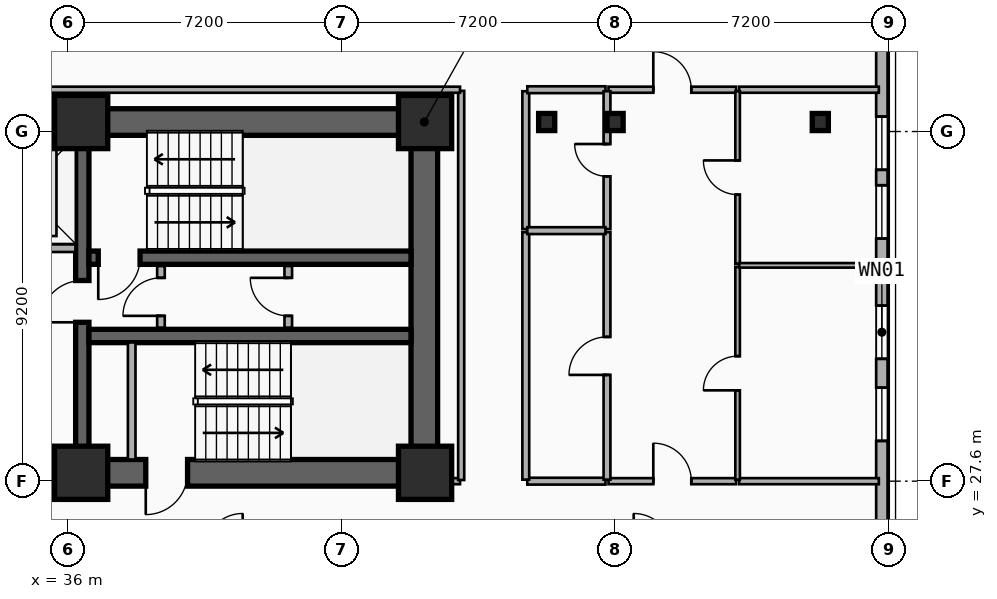
"""IFC4 building model, lengths in metres.
Left out: names, types, materials, properties, quantities, classifications, styles, units other than length and angle.
Written with IfcOpenShell. Run it as: python <this file> out.ifc"""

import sys

from ifc_helpers import new_model, si_unit, direction, frame, frame_2d, origin, origin_2d, place, context, subcontext, project, spatial, rectangle, i_section, extrude, element, fill, save


model = new_model("IFC4")
c1 = context("Model", 3, precision=1e-05, world=origin(), true_north=direction((0.0, 1.0)))
c2 = subcontext(c1, "Body", "Model", "MODEL_VIEW")
j1 = project(units=[si_unit("LENGTHUNIT", "METRE"), si_unit("PLANEANGLEUNIT", "RADIAN")], contexts=[c1])
p1 = place(None, origin())
s1 = spatial("IfcSite", under=j1, at=p1, CompositionType="ELEMENT")
p2 = place(p1, origin())
s2 = spatial("IfcBuilding", under=s1, at=p2, CompositionType="ELEMENT")
p3 = place(p2, frame((0.0, 0.0, 64.0)))
s3 = spatial("IfcBuildingStorey", under=s2, at=p3, CompositionType="ELEMENT", Elevation=64.0)
p4 = place(p3, frame((12.15, 37.05, 0.0), z_axis=(0.0, 0.0, 1.0), x_axis=(1.0, 0.0, 0.0)))
e1 = element("IfcWall", 1, at=p4, inside=s3, PredefinedType="SHEAR", context=c2, shape_type="SweptSolid", body=[
    extrude(rectangle(XDim=33.23, YDim=0.7, at=frame_2d((16.615, 0.0))), origin(), (0.0, 0.0, 1.0), 3.5),
])
p5 = place(p3, frame((45.38, 27.82, 0.0), z_axis=(0.0, 0.0, 1.0), x_axis=(-1.0, 0.0, 0.0)))
e2 = element("IfcWall", 2, at=p5, inside=s3, PredefinedType="SHEAR", context=c2, shape_type="SweptSolid", body=[
    extrude(rectangle(XDim=12.23, YDim=0.7, at=frame_2d((6.115, 0.0))), origin(), (0.0, 0.0, 1.0), 3.5),
])
p6 = place(p5, frame((9.93, 0.0, 0.0)))
e3 = element("IfcOpeningElement", 3, at=p6, cuts=e2, PredefinedType="OPENING", context=c2, shape_type="SweptSolid", body=[
    extrude(rectangle(XDim=1.1, YDim=2.15, at=frame_2d((0.55, 1.075))), frame((0.0, 0.36, 0.0), z_axis=(0.0, -1.0, 0.0), x_axis=(1.0, 0.0, 0.0)), (0.0, 0.0, 1.0), 0.72),
])
p7 = place(p5, frame((6.23, 0.0, 0.0)))
e4 = element("IfcOpeningElement", 4, at=p7, cuts=e2, PredefinedType="OPENING", context=c2, shape_type="SweptSolid", body=[
    extrude(rectangle(XDim=1.1, YDim=2.15, at=frame_2d((0.55, 1.075))), frame((0.0, 0.36, 0.0), z_axis=(0.0, -1.0, 0.0), x_axis=(1.0, 0.0, 0.0)), (0.0, 0.0, 1.0), 0.72),
])
p8 = place(p3, frame((45.38, 28.17, 0.0), z_axis=(0.0, 0.0, 1.0), x_axis=(0.0, 1.0, 0.0)))
e5 = element("IfcWall", 5, at=p8, inside=s3, PredefinedType="SHEAR", context=c2, shape_type="SweptSolid", body=[
    extrude(rectangle(XDim=8.53, YDim=0.7, at=frame_2d((4.265, 0.0))), origin(), (0.0, 0.0, 1.0), 3.5),
])
p9 = place(p3, frame((36.38, 28.17, 0.0), z_axis=(0.0, 0.0, 1.0), x_axis=(0.0, 1.0, 0.0)))
e6 = element("IfcWall", 6, at=p9, inside=s3, PredefinedType="SHEAR", context=c2, shape_type="SweptSolid", body=[
    extrude(rectangle(XDim=8.53, YDim=0.35, at=frame_2d((4.265, 0.0))), origin(), (0.0, 0.0, 1.0), 3.5),
])
p10 = place(p9, frame((3.61, 0.0, 0.0)))
e7 = element("IfcOpeningElement", 7, at=p10, cuts=e6, PredefinedType="OPENING", context=c2, shape_type="SweptSolid", body=[
    extrude(rectangle(XDim=1.1, YDim=2.15, at=frame_2d((0.55, 1.075))), frame((0.0, 0.185, 0.0), z_axis=(0.0, -1.0, 0.0), x_axis=(1.0, 0.0, 0.0)), (0.0, 0.0, 1.0), 0.37),
])
p11 = place(p3, frame((45.03, 33.48, 0.0), z_axis=(0.0, 0.0, 1.0), x_axis=(-1.0, 0.0, 0.0)))
e8 = element("IfcWall", 8, at=p11, inside=s3, PredefinedType="SHEAR", context=c2, shape_type="SweptSolid", body=[
    extrude(rectangle(XDim=8.475, YDim=0.35, at=frame_2d((4.238, 0.0))), origin(), (0.0, 0.0, 1.0), 3.5),
])
p12 = place(p11, frame((7.13, 0.0, 0.0)))
e9 = element("IfcOpeningElement", 9, at=p12, cuts=e8, PredefinedType="OPENING", context=c2, shape_type="SweptSolid", body=[
    extrude(rectangle(XDim=1.1, YDim=2.15, at=frame_2d((0.55, 1.075))), frame((0.0, 0.185, 0.0), z_axis=(0.0, -1.0, 0.0), x_axis=(1.0, 0.0, 0.0)), (0.0, 0.0, 1.0), 0.37),
])
p13 = place(p3, frame((36.555, 31.42, 0.0), z_axis=(0.0, 0.0, 1.0), x_axis=(1.0, 0.0, 0.0)))
e10 = element("IfcWall", 10, at=p13, inside=s3, PredefinedType="SHEAR", context=c2, shape_type="SweptSolid", body=[
    extrude(rectangle(XDim=8.475, YDim=0.35, at=frame_2d((4.238, 0.0))), origin(), (0.0, 0.0, 1.0), 3.5),
])
for number, where, z_axis, x_axis in (
    (11, (36.35, 27.82, 0.0), (0.0, 0.0, 1.0), (1.0, 0.0, 0.0)),
    (12, (36.35, 37.05, 0.0), (0.0, 0.0, 1.0), (1.0, 0.0, 0.0)),
    (13, (45.4, 27.82, 0.0), (0.0, 0.0, 1.0), (1.0, 0.0, 0.0)),
    (14, (45.4, 37.05, 0.0), (0.0, 0.0, 1.0), (1.0, 0.0, 0.0)),
):
    element("IfcColumn", number, at=place(p3, frame(where, z_axis=z_axis, x_axis=x_axis)), inside=s3, PredefinedType="COLUMN", context=c2, shape_type="SweptSolid", body=[
        extrude(rectangle(XDim=1.4, YDim=1.4, at=origin_2d()), origin(), (0.0, 0.0, 1.0), 3.5),
    ])
for number, where, z_axis, x_axis in (
    (15, (48.6, 37.05, 0.0), (0.0, 0.0, 1.0), (1.0, 0.0, 0.0)),
    (16, (50.4, 37.05, 0.0), (0.0, 0.0, 1.0), (1.0, 0.0, 0.0)),
    (17, (55.8, 37.05, 0.0), (0.0, 0.0, 1.0), (1.0, 0.0, 0.0)),
):
    element("IfcColumn", number, at=place(p3, frame(where, z_axis=z_axis, x_axis=x_axis)), inside=s3, PredefinedType="COLUMN", context=c2, shape_type="SweptSolid", body=[
        extrude(i_section(OverallWidth=0.424, OverallDepth=0.45, WebThickness=0.041, FlangeThickness=0.065, FilletRadius=0.015, at=origin_2d()), origin(), (0.0, 0.0, 1.0), 3.5),
    ])
p14 = place(p3, frame((57.42, 41.0, 0.0), z_axis=(0.0, 0.0, 1.0), x_axis=(0.0, -1.0, 0.0)))
e18 = element("IfcWall", 18, at=p14, inside=s3, PredefinedType="SOLIDWALL", context=c2, shape_type="SweptSolid", body=[
    extrude(rectangle(XDim=15.2, YDim=0.3, at=frame_2d((7.6, 0.0))), origin(), (0.0, 0.0, 1.0), 3.24),
])
p15 = place(p14, frame((8.781, 0.0, 0.48)))
e19 = element("IfcOpeningElement", 19, at=p15, cuts=e18, PredefinedType="OPENING", context=c2, shape_type="SweptSolid", body=[
    extrude(rectangle(XDim=1.4, YDim=1.8, at=frame_2d((0.7, 0.9))), frame((0.0, 0.16, 0.0), z_axis=(0.0, -1.0, 0.0), x_axis=(1.0, 0.0, 0.0)), (0.0, 0.0, 1.0), 0.32),
])
p16 = place(p14, frame((10.94, 0.0, 0.48)))
e20 = element("IfcOpeningElement", 20, at=p16, cuts=e18, PredefinedType="OPENING", context=c2, shape_type="SweptSolid", body=[
    extrude(rectangle(XDim=1.4, YDim=1.8, at=frame_2d((0.7, 0.9))), frame((0.0, 0.16, 0.0), z_axis=(0.0, -1.0, 0.0), x_axis=(1.0, 0.0, 0.0)), (0.0, 0.0, 1.0), 0.32),
])
p17 = place(p14, frame((3.807, 0.0, 0.48)))
e21 = element("IfcOpeningElement", 21, at=p17, cuts=e18, PredefinedType="OPENING", context=c2, shape_type="SweptSolid", body=[
    extrude(rectangle(XDim=1.4, YDim=1.8, at=frame_2d((0.7, 0.9))), frame((0.0, 0.16, 0.0), z_axis=(0.0, -1.0, 0.0), x_axis=(1.0, 0.0, 0.0)), (0.0, 0.0, 1.0), 0.32),
])
p18 = place(p14, frame((5.614, 0.0, 0.48)))
e22 = element("IfcOpeningElement", 22, at=p18, cuts=e18, PredefinedType="OPENING", context=c2, shape_type="SweptSolid", body=[
    extrude(rectangle(XDim=1.4, YDim=1.8, at=frame_2d((0.7, 0.9))), frame((0.0, 0.16, 0.0), z_axis=(0.0, -1.0, 0.0), x_axis=(1.0, 0.0, 0.0)), (0.0, 0.0, 1.0), 0.32),
])
p19 = place(p3, frame((33.475, 33.73, 0.0), z_axis=(0.0, 0.0, 1.0), x_axis=(1.0, 0.0, 0.0)))
e23 = element("IfcWall", 23, at=p19, inside=s3, PredefinedType="PARTITIONING", context=c2, shape_type="SweptSolid", body=[
    extrude(rectangle(XDim=2.725, YDim=0.2, at=frame_2d((1.362, 0.0))), origin(), (0.0, 0.0, 1.0), 2.212),
])
p20 = place(p19, frame((0.812, 0.0, 0.0)))
e24 = element("IfcOpeningElement", 24, at=p20, cuts=e23, PredefinedType="OPENING", context=c2, shape_type="SweptSolid", body=[
    extrude(rectangle(XDim=1.1, YDim=2.15, at=frame_2d((0.55, 1.075))), frame((0.0, 0.11, 0.0), z_axis=(0.0, -1.0, 0.0), x_axis=(1.0, 0.0, 0.0)), (0.0, 0.0, 1.0), 0.22),
])
p21 = place(p3, frame((37.68, 28.17, 0.0), z_axis=(0.0, 0.0, 1.0), x_axis=(0.0, 1.0, 0.0)))
e25 = element("IfcWall", 25, at=p21, inside=s3, PredefinedType="PARTITIONING", context=c2, shape_type="SweptSolid", body=[
    extrude(rectangle(XDim=3.08, YDim=0.2, at=frame_2d((1.54, 0.0))), origin(), (0.0, 0.0, 1.0), 2.62),
])
p22 = place(p3, frame((38.45, 31.64, 0.0), z_axis=(0.0, 0.0, 1.0), x_axis=(0.0, 1.0, 0.0)))
e26 = element("IfcWall", 26, at=p22, inside=s3, PredefinedType="PARTITIONING", context=c2, shape_type="SweptSolid", body=[
    extrude(rectangle(XDim=1.62, YDim=0.2, at=frame_2d((0.81, 0.0))), origin(), (0.0, 0.0, 1.0), 3.24),
])
p23 = place(p22, frame((0.31, 0.0, 0.0)))
e27 = element("IfcOpeningElement", 27, at=p23, cuts=e26, PredefinedType="OPENING", context=c2, shape_type="SweptSolid", body=[
    extrude(rectangle(XDim=1.0, YDim=2.15, at=frame_2d((0.5, 1.075))), frame((0.0, 0.11, 0.0), z_axis=(0.0, -1.0, 0.0), x_axis=(1.0, 0.0, 0.0)), (0.0, 0.0, 1.0), 0.22),
])
p24 = place(p3, frame((41.8, 31.64, 0.0), z_axis=(0.0, 0.0, 1.0), x_axis=(0.0, 1.0, 0.0)))
e28 = element("IfcWall", 28, at=p24, inside=s3, PredefinedType="PARTITIONING", context=c2, shape_type="SweptSolid", body=[
    extrude(rectangle(XDim=1.62, YDim=0.2, at=frame_2d((0.81, 0.0))), origin(), (0.0, 0.0, 1.0), 3.24),
])
p25 = place(p24, frame((0.31, 0.0, 0.0)))
e29 = element("IfcOpeningElement", 29, at=p25, cuts=e28, PredefinedType="OPENING", context=c2, shape_type="SweptSolid", body=[
    extrude(rectangle(XDim=1.0, YDim=2.15, at=frame_2d((0.5, 1.075))), frame((0.0, 0.11, 0.0), z_axis=(0.0, -1.0, 0.0), x_axis=(1.0, 0.0, 0.0)), (0.0, 0.0, 1.0), 0.22),
])
p26 = place(p3, frame((50.227, 27.6, 0.0), z_axis=(0.0, 0.0, 1.0), x_axis=(1.0, 0.0, 0.0)))
e30 = element("IfcWall", 30, at=p26, inside=s3, PredefinedType="PARTITIONING", context=c2, shape_type="SweptSolid", body=[
    extrude(rectangle(XDim=3.357, YDim=0.16, at=frame_2d((1.678, 0.0))), origin(), (0.0, 0.0, 1.0), 2.57),
])
p27 = place(p26, frame((1.178, 0.0, 0.0)))
e31 = element("IfcOpeningElement", 31, at=p27, cuts=e30, PredefinedType="OPENING", context=c2, shape_type="SweptSolid", body=[
    extrude(rectangle(XDim=1.0, YDim=2.15, at=frame_2d((0.5, 1.075))), frame((0.0, 0.09, 0.0), z_axis=(0.0, -1.0, 0.0), x_axis=(1.0, 0.0, 0.0)), (0.0, 0.0, 1.0), 0.18),
])
p28 = place(p3, frame((48.09, 27.6, 0.0), z_axis=(0.0, 0.0, 1.0), x_axis=(1.0, 0.0, 0.0)))
e32 = element("IfcWall", 32, at=p28, inside=s3, PredefinedType="PLUMBINGWALL", context=c2, shape_type="SweptSolid", body=[
    extrude(rectangle(XDim=2.057, YDim=0.18, at=frame_2d((1.028, 0.0))), origin(), (0.0, 0.0, 1.0), 2.57),
])
p29 = place(p3, frame((53.664, 27.6, 0.0), z_axis=(0.0, 0.0, 1.0), x_axis=(1.0, 0.0, 0.0)))
e33 = element("IfcWall", 33, at=p29, inside=s3, PredefinedType="PARTITIONING", context=c2, shape_type="SweptSolid", body=[
    extrude(rectangle(XDim=3.676, YDim=0.16, at=frame_2d((1.838, 0.0))), origin(), (0.0, 0.0, 1.0), 2.57),
])
p30 = place(p3, frame((48.05, 27.64, 0.0), z_axis=(0.0, 0.0, 1.0), x_axis=(0.0, 1.0, 0.0)))
e34 = element("IfcWall", 34, at=p30, inside=s3, PredefinedType="PLUMBINGWALL", context=c2, shape_type="SweptSolid", body=[
    extrude(rectangle(XDim=6.512, YDim=0.18, at=frame_2d((3.256, 0.0))), origin(), (0.0, 0.0, 1.0), 3.24),
])
p31 = place(p3, frame((48.05, 34.232, 0.0), z_axis=(0.0, 0.0, 1.0), x_axis=(0.0, 1.0, 0.0)))
e35 = element("IfcWall", 35, at=p31, inside=s3, PredefinedType="PLUMBINGWALL", context=c2, shape_type="SweptSolid", body=[
    extrude(rectangle(XDim=3.628, YDim=0.18, at=frame_2d((1.814, 0.0))), origin(), (0.0, 0.0, 1.0), 2.72),
])
p32 = place(p3, frame((50.227, 37.9, 0.0), z_axis=(0.0, 0.0, 1.0), x_axis=(1.0, 0.0, 0.0)))
e36 = element("IfcWall", 36, at=p32, inside=s3, PredefinedType="PARTITIONING", context=c2, shape_type="SweptSolid", body=[
    extrude(rectangle(XDim=3.357, YDim=0.16, at=frame_2d((1.678, 0.0))), origin(), (0.0, 0.0, 1.0), 3.24),
])
p33 = place(p32, frame((1.178, 0.0, 0.0)))
e37 = element("IfcOpeningElement", 37, at=p33, cuts=e36, PredefinedType="OPENING", context=c2, shape_type="SweptSolid", body=[
    extrude(rectangle(XDim=1.0, YDim=2.15, at=frame_2d((0.5, 1.075))), frame((0.0, 0.09, 0.0), z_axis=(0.0, -1.0, 0.0), x_axis=(1.0, 0.0, 0.0)), (0.0, 0.0, 1.0), 0.18),
])
p34 = place(p3, frame((48.09, 37.9, 0.0), z_axis=(0.0, 0.0, 1.0), x_axis=(1.0, 0.0, 0.0)))
e38 = element("IfcWall", 38, at=p34, inside=s3, PredefinedType="PLUMBINGWALL", context=c2, shape_type="SweptSolid", body=[
    extrude(rectangle(XDim=2.057, YDim=0.18, at=frame_2d((1.028, 0.0))), origin(), (0.0, 0.0, 1.0), 3.24),
])
p35 = place(p3, frame((53.664, 37.9, 0.0), z_axis=(0.0, 0.0, 1.0), x_axis=(1.0, 0.0, 0.0)))
e39 = element("IfcWall", 39, at=p35, inside=s3, PredefinedType="PARTITIONING", context=c2, shape_type="SweptSolid", body=[
    extrude(rectangle(XDim=3.676, YDim=0.16, at=frame_2d((1.838, 0.0))), origin(), (0.0, 0.0, 1.0), 3.24),
])
p36 = place(p3, frame((50.187, 27.64, 0.0), z_axis=(0.0, 0.0, 1.0), x_axis=(0.0, 1.0, 0.0)))
e40 = element("IfcWall", 40, at=p36, inside=s3, PredefinedType="PLUMBINGWALL", context=c2, shape_type="SweptSolid", body=[
    extrude(rectangle(XDim=6.512, YDim=0.18, at=frame_2d((3.256, 0.0))), origin(), (0.0, 0.0, 1.0), 2.57),
])
p37 = place(p36, frame((2.756, 0.0, 0.0)))
e41 = element("IfcOpeningElement", 41, at=p37, cuts=e40, PredefinedType="OPENING", context=c2, shape_type="SweptSolid", body=[
    extrude(rectangle(XDim=1.0, YDim=2.15, at=frame_2d((0.5, 1.075))), frame((0.0, 0.1, 0.0), z_axis=(0.0, -1.0, 0.0), x_axis=(1.0, 0.0, 0.0)), (0.0, 0.0, 1.0), 0.2),
])
p38 = place(p3, frame((50.187, 34.232, 0.0), z_axis=(0.0, 0.0, 1.0), x_axis=(0.0, 1.0, 0.0)))
e42 = element("IfcWall", 42, at=p38, inside=s3, PredefinedType="PLUMBINGWALL", context=c2, shape_type="SweptSolid", body=[
    extrude(rectangle(XDim=3.628, YDim=0.18, at=frame_2d((1.814, 0.0))), origin(), (0.0, 0.0, 1.0), 2.57),
])
p39 = place(p38, frame((1.389, 0.0, 0.0)))
e43 = element("IfcOpeningElement", 43, at=p39, cuts=e42, PredefinedType="OPENING", context=c2, shape_type="SweptSolid", body=[
    extrude(rectangle(XDim=0.85, YDim=2.1, at=frame_2d((0.425, 1.05))), frame((0.0, 0.1, 0.0), z_axis=(0.0, -1.0, 0.0), x_axis=(1.0, 0.0, 0.0)), (0.0, 0.0, 1.0), 0.2),
])
p40 = place(p3, frame((53.624, 27.64, 0.0), z_axis=(0.0, 0.0, 1.0), x_axis=(0.0, 1.0, 0.0)))
e44 = element("IfcWall", 44, at=p40, inside=s3, PredefinedType="PARTITIONING", context=c2, shape_type="SweptSolid", body=[
    extrude(rectangle(XDim=5.599, YDim=0.12, at=frame_2d((2.8, 0.0))), origin(), (0.0, 0.0, 1.0), 3.24),
])
p41 = place(p40, frame((2.35, 0.0, 0.0)))
e45 = element("IfcOpeningElement", 45, at=p41, cuts=e44, PredefinedType="OPENING", context=c2, shape_type="SweptSolid", body=[
    extrude(rectangle(XDim=0.9, YDim=2.1, at=frame_2d((0.45, 1.05))), frame((0.0, 0.07, 0.0), z_axis=(0.0, -1.0, 0.0), x_axis=(1.0, 0.0, 0.0)), (0.0, 0.0, 1.0), 0.14),
])
p42 = place(p3, frame((53.624, 33.319, 0.0), z_axis=(0.0, 0.0, 1.0), x_axis=(0.0, 1.0, 0.0)))
e46 = element("IfcWall", 46, at=p42, inside=s3, PredefinedType="PARTITIONING", context=c2, shape_type="SweptSolid", body=[
    extrude(rectangle(XDim=4.541, YDim=0.12, at=frame_2d((2.271, 0.0))), origin(), (0.0, 0.0, 1.0), 2.72),
])
p43 = place(p42, frame((1.821, 0.0, 0.0)))
e47 = element("IfcOpeningElement", 47, at=p43, cuts=e46, PredefinedType="OPENING", context=c2, shape_type="SweptSolid", body=[
    extrude(rectangle(XDim=0.9, YDim=2.1, at=frame_2d((0.45, 1.05))), frame((0.0, 0.07, 0.0), z_axis=(0.0, -1.0, 0.0), x_axis=(1.0, 0.0, 0.0)), (0.0, 0.0, 1.0), 0.14),
])
p44 = place(p3, frame((48.09, 34.192, 0.0), z_axis=(0.0, 0.0, 1.0), x_axis=(1.0, 0.0, 0.0)))
e48 = element("IfcWall", 48, at=p44, inside=s3, PredefinedType="PLUMBINGWALL", context=c2, shape_type="SweptSolid", body=[
    extrude(rectangle(XDim=2.057, YDim=0.18, at=frame_2d((1.028, 0.0))), origin(), (0.0, 0.0, 1.0), 2.57),
])
p45 = place(p3, frame((53.664, 33.279, 0.0), z_axis=(0.0, 0.0, 1.0), x_axis=(1.0, 0.0, 0.0)))
e49 = element("IfcWall", 49, at=p45, inside=s3, PredefinedType="PARTITIONING", context=c2, shape_type="SweptSolid", body=[
    extrude(rectangle(XDim=3.676, YDim=0.12, at=frame_2d((1.838, 0.0))), origin(), (0.0, 0.0, 1.0), 2.57),
])
p46 = place(p3, frame((45.41, 27.6, 0.0), z_axis=(0.0, 0.0, 1.0), x_axis=(1.0, 0.0, 0.0)))
e50 = element("IfcWall", 50, at=p46, inside=s3, PredefinedType="PARTITIONING", context=c2, shape_type="SweptSolid", body=[
    extrude(rectangle(XDim=0.91, YDim=0.16, at=frame_2d((0.455, 0.0))), origin(), (0.0, 0.0, 1.0), 2.28),
])
p47 = place(p3, frame((46.35, 27.63, 0.0), z_axis=(0.0, 0.0, 1.0), x_axis=(0.0, 1.0, 0.0)))
e51 = element("IfcWall", 51, at=p47, inside=s3, PredefinedType="PARTITIONING", context=c2, shape_type="SweptSolid", body=[
    extrude(rectangle(XDim=10.24, YDim=0.16, at=frame_2d((5.12, 0.0))), origin(), (0.0, 0.0, 1.0), 2.72),
])
p48 = place(p3, frame((11.28, 37.9, 0.0), z_axis=(0.0, 0.0, 1.0), x_axis=(1.0, 0.0, 0.0)))
e52 = element("IfcWall", 52, at=p48, inside=s3, PredefinedType="PARTITIONING", context=c2, shape_type="SweptSolid", body=[
    extrude(rectangle(XDim=35.04, YDim=0.16, at=frame_2d((17.52, 0.0))), origin(), (0.0, 0.0, 1.0), 3.24),
])
p49 = place(p15, origin())
e53 = element("IfcWindow", 53, at=p49, inside=s3, PartitioningType="SINGLE_PANEL", PredefinedType="WINDOW", context=c2, shape_type="SweptSolid", body=[
    extrude(rectangle(XDim=1.4, YDim=1.8, at=frame_2d((0.7, 0.9))), frame((0.0, 0.03, 0.0), z_axis=(0.0, -1.0, 0.0), x_axis=(1.0, 0.0, 0.0)), (0.0, 0.0, 1.0), 0.06),
])
fill(e19, e53)
p50 = place(p16, origin())
e54 = element("IfcWindow", 54, at=p50, inside=s3, PartitioningType="SINGLE_PANEL", PredefinedType="WINDOW", context=c2, shape_type="SweptSolid", body=[
    extrude(rectangle(XDim=1.4, YDim=1.8, at=frame_2d((0.7, 0.9))), frame((0.0, 0.03, 0.0), z_axis=(0.0, -1.0, 0.0), x_axis=(1.0, 0.0, 0.0)), (0.0, 0.0, 1.0), 0.06),
])
fill(e20, e54)
p51 = place(p17, origin())
e55 = element("IfcWindow", 55, at=p51, inside=s3, PartitioningType="SINGLE_PANEL", PredefinedType="WINDOW", context=c2, shape_type="SweptSolid", body=[
    extrude(rectangle(XDim=1.4, YDim=1.8, at=frame_2d((0.7, 0.9))), frame((0.0, 0.03, 0.0), z_axis=(0.0, -1.0, 0.0), x_axis=(1.0, 0.0, 0.0)), (0.0, 0.0, 1.0), 0.06),
])
fill(e21, e55)
p52 = place(p18, origin())
e56 = element("IfcWindow", 56, at=p52, inside=s3, PartitioningType="SINGLE_PANEL", PredefinedType="WINDOW", context=c2, shape_type="SweptSolid", body=[
    extrude(rectangle(XDim=1.4, YDim=1.8, at=frame_2d((0.7, 0.9))), frame((0.0, 0.03, 0.0), z_axis=(0.0, -1.0, 0.0), x_axis=(1.0, 0.0, 0.0)), (0.0, 0.0, 1.0), 0.06),
])
fill(e22, e56)
p53 = place(p12, origin())
e57 = element("IfcDoor", 57, at=p53, inside=s3, OperationType="SINGLE_SWING_RIGHT", PredefinedType="DOOR", context=c2, shape_type="SweptSolid", body=[
    extrude(rectangle(XDim=1.1, YDim=2.15, at=frame_2d((0.55, 1.075))), frame((0.0, 0.025, 0.0), z_axis=(0.0, -1.0, 0.0), x_axis=(1.0, 0.0, 0.0)), (0.0, 0.0, 1.0), 0.05),
])
fill(e9, e57)
p54 = place(p10, origin())
e58 = element("IfcDoor", 58, at=p54, inside=s3, OperationType="SINGLE_SWING_LEFT", PredefinedType="DOOR", context=c2, shape_type="SweptSolid", body=[
    extrude(rectangle(XDim=1.1, YDim=2.15, at=frame_2d((0.55, 1.075))), frame((0.0, 0.025, 0.0), z_axis=(0.0, -1.0, 0.0), x_axis=(1.0, 0.0, 0.0)), (0.0, 0.0, 1.0), 0.05),
])
fill(e7, e58)
p55 = place(p7, origin())
e59 = element("IfcDoor", 59, at=p55, inside=s3, OperationType="SINGLE_SWING_RIGHT", PredefinedType="DOOR", context=c2, shape_type="SweptSolid", body=[
    extrude(rectangle(XDim=1.1, YDim=2.15, at=frame_2d((0.55, 1.075))), frame((0.0, 0.025, 0.0), z_axis=(0.0, -1.0, 0.0), x_axis=(1.0, 0.0, 0.0)), (0.0, 0.0, 1.0), 0.05),
])
fill(e4, e59)
p56 = place(p23, origin())
e60 = element("IfcDoor", 60, at=p56, inside=s3, OperationType="SINGLE_SWING_LEFT", PredefinedType="DOOR", context=c2, shape_type="SweptSolid", body=[
    extrude(rectangle(XDim=1.0, YDim=2.15, at=frame_2d((0.5, 1.075))), frame((0.0, 0.025, 0.0), z_axis=(0.0, -1.0, 0.0), x_axis=(1.0, 0.0, 0.0)), (0.0, 0.0, 1.0), 0.05),
])
fill(e27, e60)
p57 = place(p25, origin())
e61 = element("IfcDoor", 61, at=p57, inside=s3, OperationType="SINGLE_SWING_RIGHT", PredefinedType="DOOR", context=c2, shape_type="SweptSolid", body=[
    extrude(rectangle(XDim=1.0, YDim=2.15, at=frame_2d((0.5, 1.075))), frame((0.0, 0.025, 0.0), z_axis=(0.0, -1.0, 0.0), x_axis=(1.0, 0.0, 0.0)), (0.0, 0.0, 1.0), 0.05),
])
fill(e29, e61)
p58 = place(p27, origin())
e62 = element("IfcDoor", 62, at=p58, inside=s3, OperationType="SINGLE_SWING_LEFT", PredefinedType="DOOR", context=c2, shape_type="SweptSolid", body=[
    extrude(rectangle(XDim=1.0, YDim=2.15, at=frame_2d((0.5, 1.075))), frame((0.0, 0.025, 0.0), z_axis=(0.0, -1.0, 0.0), x_axis=(1.0, 0.0, 0.0)), (0.0, 0.0, 1.0), 0.05),
])
fill(e31, e62)
p59 = place(p33, origin())
e63 = element("IfcDoor", 63, at=p59, inside=s3, OperationType="SINGLE_SWING_LEFT", PredefinedType="DOOR", context=c2, shape_type="SweptSolid", body=[
    extrude(rectangle(XDim=1.0, YDim=2.15, at=frame_2d((0.5, 1.075))), frame((0.0, 0.025, 0.0), z_axis=(0.0, -1.0, 0.0), x_axis=(1.0, 0.0, 0.0)), (0.0, 0.0, 1.0), 0.05),
])
fill(e37, e63)
p60 = place(p37, origin())
e64 = element("IfcDoor", 64, at=p60, inside=s3, OperationType="SINGLE_SWING_LEFT", PredefinedType="DOOR", context=c2, shape_type="SweptSolid", body=[
    extrude(rectangle(XDim=1.0, YDim=2.15, at=frame_2d((0.5, 1.075))), frame((0.0, 0.025, 0.0), z_axis=(0.0, -1.0, 0.0), x_axis=(1.0, 0.0, 0.0)), (0.0, 0.0, 1.0), 0.05),
])
fill(e41, e64)
p61 = place(p39, origin())
e65 = element("IfcDoor", 65, at=p61, inside=s3, OperationType="SINGLE_SWING_RIGHT", PredefinedType="DOOR", context=c2, shape_type="SweptSolid", body=[
    extrude(rectangle(XDim=0.85, YDim=2.1, at=frame_2d((0.425, 1.05))), frame((0.0, 0.025, 0.0), z_axis=(0.0, -1.0, 0.0), x_axis=(1.0, 0.0, 0.0)), (0.0, 0.0, 1.0), 0.05),
])
fill(e43, e65)
p62 = place(p41, origin())
e66 = element("IfcDoor", 66, at=p62, inside=s3, OperationType="SINGLE_SWING_LEFT", PredefinedType="DOOR", context=c2, shape_type="SweptSolid", body=[
    extrude(rectangle(XDim=0.9, YDim=2.1, at=frame_2d((0.45, 1.05))), frame((0.0, 0.025, 0.0), z_axis=(0.0, -1.0, 0.0), x_axis=(1.0, 0.0, 0.0)), (0.0, 0.0, 1.0), 0.05),
])
fill(e45, e66)
p63 = place(p43, origin())
e67 = element("IfcDoor", 67, at=p63, inside=s3, OperationType="SINGLE_SWING_RIGHT", PredefinedType="DOOR", context=c2, shape_type="SweptSolid", body=[
    extrude(rectangle(XDim=0.9, YDim=2.1, at=frame_2d((0.45, 1.05))), frame((0.0, 0.025, 0.0), z_axis=(0.0, -1.0, 0.0), x_axis=(1.0, 0.0, 0.0)), (0.0, 0.0, 1.0), 0.05),
])
fill(e47, e67)
save(model, sys.argv[1])
